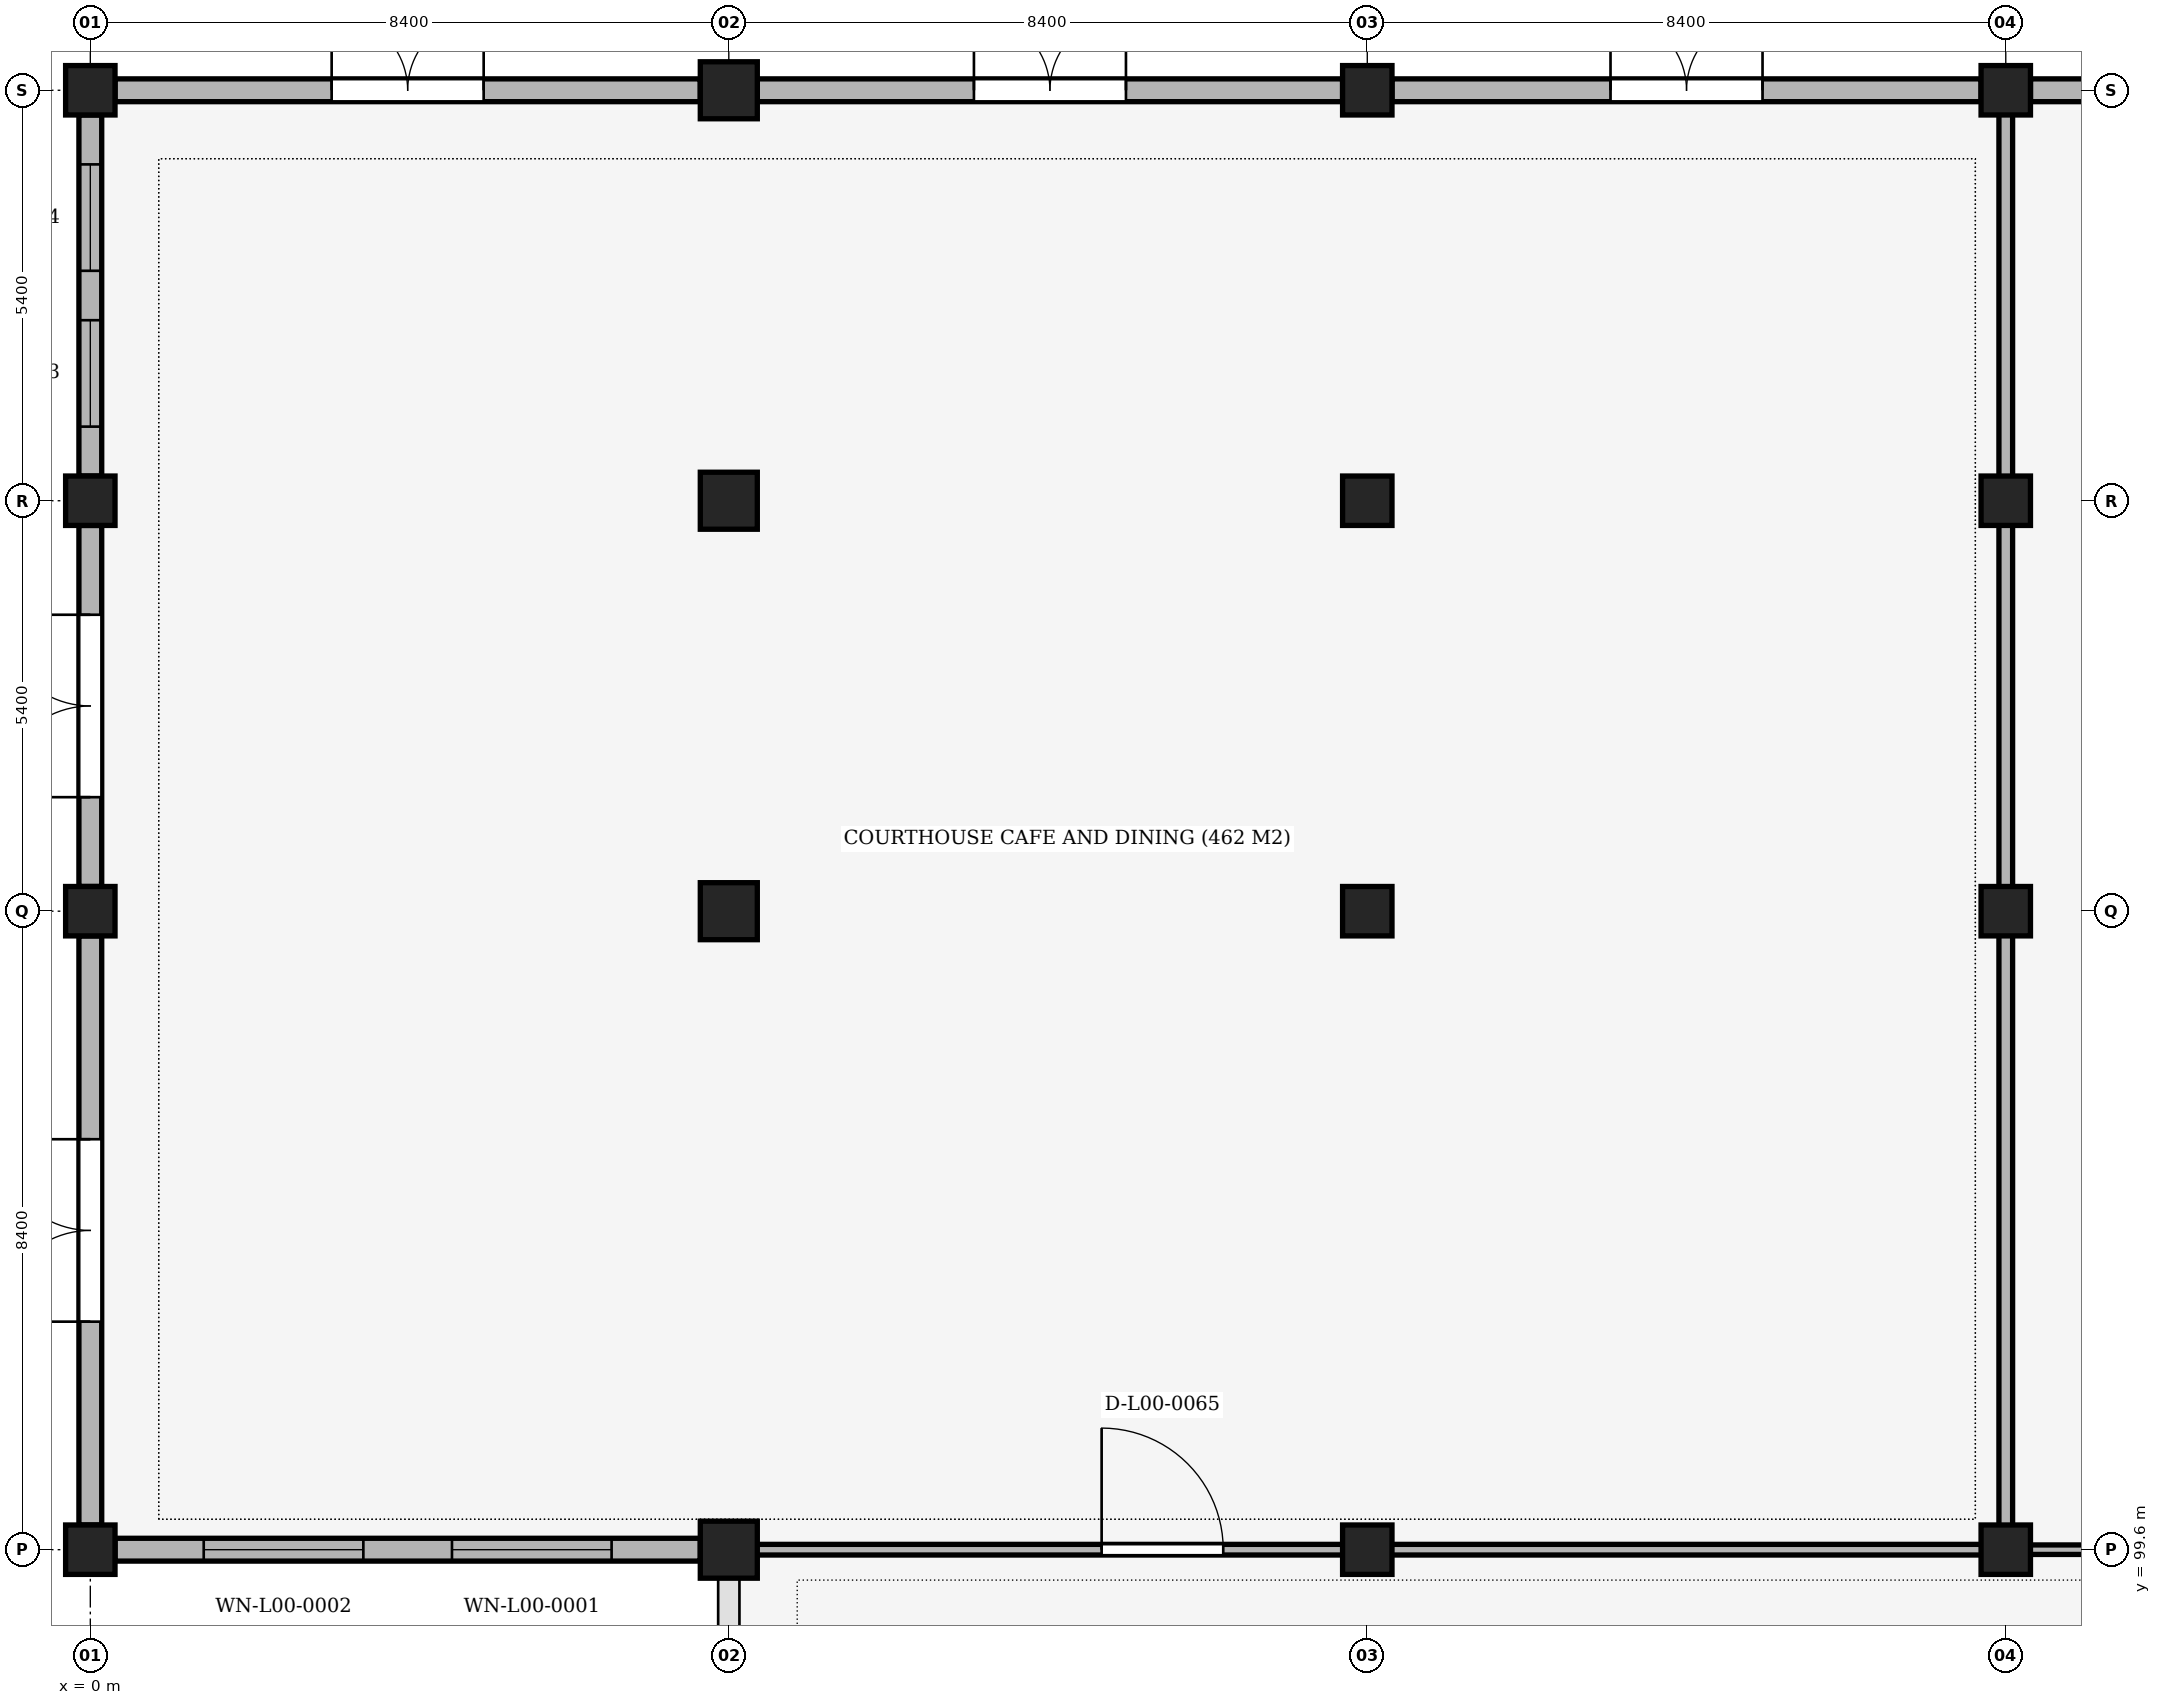
"""IFC4 building model, lengths in metres.
Left out: names, types, materials, properties, quantities, classifications, styles, units other than length and angle.
Written with IfcOpenShell. Run it as: python <this file> out.ifc"""

import sys

from ifc_helpers import new_model, si_unit, direction, frame, frame_2d, origin, origin_2d, place, context, subcontext, project, spatial, rectangle, circle, extrude, element, fill, save


model = new_model("IFC4")
c1 = context("Model", 3, precision=1e-05, world=origin(), true_north=direction((0.0, 1.0)))
c2 = subcontext(c1, "Body", "Model", "MODEL_VIEW")
j1 = project(units=[si_unit("LENGTHUNIT", "METRE"), si_unit("PLANEANGLEUNIT", "RADIAN")], contexts=[c1])
p1 = place(None, origin())
s1 = spatial("IfcSite", under=j1, at=p1, CompositionType="ELEMENT")
p2 = place(p1, origin())
s2 = spatial("IfcBuilding", under=s1, at=p2, CompositionType="ELEMENT")
p3 = place(p2, origin())
s3 = spatial("IfcBuildingStorey", under=s2, at=p3, CompositionType="ELEMENT", Elevation=0.0)
for number, where, z_axis, x_axis in (
    (1, (0.0, 99.6, 0.0), (0.0, 0.0, 1.0), (1.0, 0.0, 0.0)),
    (2, (0.0, 108.0, 0.0), (0.0, 0.0, 1.0), (1.0, 0.0, 0.0)),
    (3, (0.0, 113.4, 0.0), (0.0, 0.0, 1.0), (1.0, 0.0, 0.0)),
    (4, (0.0, 118.8, 0.0), (0.0, 0.0, 1.0), (1.0, 0.0, 0.0)),
):
    element("IfcColumn", number, at=place(p3, frame(where, z_axis=z_axis, x_axis=x_axis)), inside=s3, PredefinedType="COLUMN", context=c2, shape_type="SweptSolid", body=[
        extrude(rectangle(XDim=0.65, YDim=0.65, at=origin_2d()), origin(), (0.0, 0.0, 1.0), 5.1),
    ])
for number, where, z_axis, x_axis in (
    (5, (8.4, 99.6, 0.0), (0.0, 0.0, 1.0), (1.0, 0.0, 0.0)),
    (6, (8.4, 108.0, 0.0), (0.0, 0.0, 1.0), (1.0, 0.0, 0.0)),
    (7, (8.4, 113.4, 0.0), (0.0, 0.0, 1.0), (1.0, 0.0, 0.0)),
    (8, (8.4, 118.8, 0.0), (0.0, 0.0, 1.0), (1.0, 0.0, 0.0)),
):
    element("IfcColumn", number, at=place(p3, frame(where, z_axis=z_axis, x_axis=x_axis)), inside=s3, PredefinedType="COLUMN", context=c2, shape_type="SweptSolid", body=[
        extrude(circle(Radius=0.375, at=origin_2d()), origin(), (0.0, 0.0, 1.0), 5.1),
    ])
for number, where, z_axis, x_axis in (
    (9, (16.8, 99.6, 0.0), (0.0, 0.0, 1.0), (1.0, 0.0, 0.0)),
    (10, (16.8, 108.0, 0.0), (0.0, 0.0, 1.0), (1.0, 0.0, 0.0)),
    (11, (16.8, 113.4, 0.0), (0.0, 0.0, 1.0), (1.0, 0.0, 0.0)),
    (12, (16.8, 118.8, 0.0), (0.0, 0.0, 1.0), (1.0, 0.0, 0.0)),
    (13, (25.2, 99.6, 0.0), (0.0, 0.0, 1.0), (1.0, 0.0, 0.0)),
    (14, (25.2, 108.0, 0.0), (0.0, 0.0, 1.0), (1.0, 0.0, 0.0)),
    (15, (25.2, 113.4, 0.0), (0.0, 0.0, 1.0), (1.0, 0.0, 0.0)),
    (16, (25.2, 118.8, 0.0), (0.0, 0.0, 1.0), (1.0, 0.0, 0.0)),
):
    element("IfcColumn", number, at=place(p3, frame(where, z_axis=z_axis, x_axis=x_axis)), inside=s3, PredefinedType="COLUMN", context=c2, shape_type="SweptSolid", body=[
        extrude(rectangle(XDim=0.65, YDim=0.65, at=origin_2d()), origin(), (0.0, 0.0, 1.0), 5.1),
    ])
p4 = place(p3, frame((8.025, 99.6, 0.0), z_axis=(0.0, 0.0, 1.0), x_axis=(-1.0, 0.0, 0.0)))
e17 = element("IfcWall", 17, at=p4, inside=s3, PredefinedType="SOLIDWALL", context=c2, shape_type="SweptSolid", body=[
    extrude(rectangle(XDim=7.7, YDim=0.3, at=frame_2d((3.85, 0.0))), origin(), (0.0, 0.0, 1.0), 4.12),
])
p5 = place(p4, frame((1.167, 0.0, 0.9)))
e18 = element("IfcOpeningElement", 18, at=p5, cuts=e17, PredefinedType="OPENING", context=c2, shape_type="SweptSolid", body=[
    extrude(rectangle(XDim=2.1, YDim=2.1, at=frame_2d((1.05, 1.05))), frame((0.0, 0.165, 0.0), z_axis=(0.0, -1.0, 0.0), x_axis=(1.0, 0.0, 0.0)), (0.0, 0.0, 1.0), 0.33),
])
p6 = place(p4, frame((4.433, 0.0, 0.9)))
e19 = element("IfcOpeningElement", 19, at=p6, cuts=e17, PredefinedType="OPENING", context=c2, shape_type="SweptSolid", body=[
    extrude(rectangle(XDim=2.1, YDim=2.1, at=frame_2d((1.05, 1.05))), frame((0.0, 0.165, 0.0), z_axis=(0.0, -1.0, 0.0), x_axis=(1.0, 0.0, 0.0)), (0.0, 0.0, 1.0), 0.33),
])
p7 = place(p3, frame((0.0, 99.925, 0.0), z_axis=(0.0, 0.0, 1.0), x_axis=(0.0, 1.0, 0.0)))
e20 = element("IfcWall", 20, at=p7, inside=s3, PredefinedType="SOLIDWALL", context=c2, shape_type="SweptSolid", body=[
    extrude(rectangle(XDim=7.75, YDim=0.3, at=frame_2d((3.875, 0.0))), origin(), (0.0, 0.0, 1.0), 4.02),
])
p8 = place(p7, frame((2.675, 0.0, 0.0)))
e21 = element("IfcOpeningElement", 21, at=p8, cuts=e20, PredefinedType="OPENING", context=c2, shape_type="SweptSolid", body=[
    extrude(rectangle(XDim=2.4, YDim=2.6, at=frame_2d((1.2, 1.3))), frame((0.0, 0.165, 0.0), z_axis=(0.0, -1.0, 0.0), x_axis=(1.0, 0.0, 0.0)), (0.0, 0.0, 1.0), 0.33),
])
p9 = place(p3, frame((0.0, 108.325, 0.0), z_axis=(0.0, 0.0, 1.0), x_axis=(0.0, 1.0, 0.0)))
e22 = element("IfcWall", 22, at=p9, inside=s3, PredefinedType="SOLIDWALL", context=c2, shape_type="SweptSolid", body=[
    extrude(rectangle(XDim=4.75, YDim=0.3, at=frame_2d((2.375, 0.0))), origin(), (0.0, 0.0, 1.0), 4.17),
])
p10 = place(p9, frame((1.175, 0.0, 0.0)))
e23 = element("IfcOpeningElement", 23, at=p10, cuts=e22, PredefinedType="OPENING", context=c2, shape_type="SweptSolid", body=[
    extrude(rectangle(XDim=2.4, YDim=2.6, at=frame_2d((1.2, 1.3))), frame((0.0, 0.165, 0.0), z_axis=(0.0, -1.0, 0.0), x_axis=(1.0, 0.0, 0.0)), (0.0, 0.0, 1.0), 0.33),
])
p11 = place(p3, frame((0.0, 113.725, 0.0), z_axis=(0.0, 0.0, 1.0), x_axis=(0.0, 1.0, 0.0)))
e24 = element("IfcWall", 24, at=p11, inside=s3, PredefinedType="SOLIDWALL", context=c2, shape_type="SweptSolid", body=[
    extrude(rectangle(XDim=4.75, YDim=0.3, at=frame_2d((2.375, 0.0))), origin(), (0.0, 0.0, 1.0), 4.17),
])
p12 = place(p11, frame((0.65, 0.0, 0.85)))
e25 = element("IfcOpeningElement", 25, at=p12, cuts=e24, PredefinedType="OPENING", context=c2, shape_type="SweptSolid", body=[
    extrude(rectangle(XDim=1.4, YDim=2.4, at=frame_2d((0.7, 1.2))), frame((0.0, 0.165, 0.0), z_axis=(0.0, -1.0, 0.0), x_axis=(1.0, 0.0, 0.0)), (0.0, 0.0, 1.0), 0.33),
])
p13 = place(p11, frame((2.7, 0.0, 0.85)))
e26 = element("IfcOpeningElement", 26, at=p13, cuts=e24, PredefinedType="OPENING", context=c2, shape_type="SweptSolid", body=[
    extrude(rectangle(XDim=1.4, YDim=2.4, at=frame_2d((0.7, 1.2))), frame((0.0, 0.165, 0.0), z_axis=(0.0, -1.0, 0.0), x_axis=(1.0, 0.0, 0.0)), (0.0, 0.0, 1.0), 0.33),
])
p14 = place(p3, frame((0.325, 118.8, 0.0), z_axis=(0.0, 0.0, 1.0), x_axis=(1.0, 0.0, 0.0)))
e27 = element("IfcWall", 27, at=p14, inside=s3, PredefinedType="SOLIDWALL", context=c2, shape_type="SweptSolid", body=[
    extrude(rectangle(XDim=7.7, YDim=0.3, at=frame_2d((3.85, 0.0))), origin(), (0.0, 0.0, 1.0), 4.12),
])
p15 = place(p14, frame((2.85, 0.0, 0.0)))
e28 = element("IfcOpeningElement", 28, at=p15, cuts=e27, PredefinedType="OPENING", context=c2, shape_type="SweptSolid", body=[
    extrude(rectangle(XDim=2.0, YDim=2.4, at=frame_2d((1.0, 1.2))), frame((0.0, 0.165, 0.0), z_axis=(0.0, -1.0, 0.0), x_axis=(1.0, 0.0, 0.0)), (0.0, 0.0, 1.0), 0.33),
])
p16 = place(p3, frame((8.775, 118.8, 0.0), z_axis=(0.0, 0.0, 1.0), x_axis=(1.0, 0.0, 0.0)))
e29 = element("IfcWall", 29, at=p16, inside=s3, PredefinedType="SOLIDWALL", context=c2, shape_type="SweptSolid", body=[
    extrude(rectangle(XDim=7.7, YDim=0.3, at=frame_2d((3.85, 0.0))), origin(), (0.0, 0.0, 1.0), 4.12),
])
p17 = place(p16, frame((2.85, 0.0, 0.0)))
e30 = element("IfcOpeningElement", 30, at=p17, cuts=e29, PredefinedType="OPENING", context=c2, shape_type="SweptSolid", body=[
    extrude(rectangle(XDim=2.0, YDim=2.4, at=frame_2d((1.0, 1.2))), frame((0.0, 0.165, 0.0), z_axis=(0.0, -1.0, 0.0), x_axis=(1.0, 0.0, 0.0)), (0.0, 0.0, 1.0), 0.33),
])
p18 = place(p3, frame((17.125, 118.8, 0.0), z_axis=(0.0, 0.0, 1.0), x_axis=(1.0, 0.0, 0.0)))
e31 = element("IfcWall", 31, at=p18, inside=s3, PredefinedType="SOLIDWALL", context=c2, shape_type="SweptSolid", body=[
    extrude(rectangle(XDim=7.75, YDim=0.3, at=frame_2d((3.875, 0.0))), origin(), (0.0, 0.0, 1.0), 4.12),
])
p19 = place(p18, frame((2.875, 0.0, 0.0)))
e32 = element("IfcOpeningElement", 32, at=p19, cuts=e31, PredefinedType="OPENING", context=c2, shape_type="SweptSolid", body=[
    extrude(rectangle(XDim=2.0, YDim=2.4, at=frame_2d((1.0, 1.2))), frame((0.0, 0.165, 0.0), z_axis=(0.0, -1.0, 0.0), x_axis=(1.0, 0.0, 0.0)), (0.0, 0.0, 1.0), 0.33),
])
p20 = place(p3, frame((25.525, 118.8, 0.0), z_axis=(0.0, 0.0, 1.0), x_axis=(1.0, 0.0, 0.0)))
e33 = element("IfcWall", 33, at=p20, inside=s3, PredefinedType="SOLIDWALL", context=c2, shape_type="SweptSolid", body=[
    extrude(rectangle(XDim=7.75, YDim=0.3, at=frame_2d((3.875, 0.0))), origin(), (0.0, 0.0, 1.0), 4.12),
])
p21 = place(p20, frame((2.875, 0.0, 0.0)))
e34 = element("IfcOpeningElement", 34, at=p21, cuts=e33, PredefinedType="OPENING", context=c2, shape_type="SweptSolid", body=[
    extrude(rectangle(XDim=2.0, YDim=2.4, at=frame_2d((1.0, 1.2))), frame((0.0, 0.165, 0.0), z_axis=(0.0, -1.0, 0.0), x_axis=(1.0, 0.0, 0.0)), (0.0, 0.0, 1.0), 0.33),
])
p22 = place(p3, frame((8.41, 99.6, 0.0), z_axis=(0.0, 0.0, 1.0), x_axis=(1.0, 0.0, 0.0)))
e35 = element("IfcWall", 35, at=p22, inside=s3, PredefinedType="PARTITIONING", context=c2, shape_type="SweptSolid", body=[
    extrude(rectangle(XDim=16.79, YDim=0.14, at=frame_2d((8.395, 0.0))), origin(), (0.0, 0.0, 1.0), 4.02),
])
p23 = place(p22, frame((4.895, 0.0, 0.0)))
e36 = element("IfcOpeningElement", 36, at=p23, cuts=e35, PredefinedType="OPENING", context=c2, shape_type="SweptSolid", body=[
    extrude(rectangle(XDim=1.6, YDim=2.3, at=frame_2d((0.8, 1.15))), frame((0.0, 0.085, 0.0), z_axis=(0.0, -1.0, 0.0), x_axis=(1.0, 0.0, 0.0)), (0.0, 0.0, 1.0), 0.17),
])
p24 = place(p3, frame((25.2, 99.6, 0.0), z_axis=(0.0, 0.0, 1.0), x_axis=(1.0, 0.0, 0.0)))
e37 = element("IfcWall", 37, at=p24, inside=s3, PredefinedType="PARTITIONING", context=c2, shape_type="SweptSolid", body=[
    extrude(rectangle(XDim=16.761, YDim=0.125, at=frame_2d((8.38, 0.0))), origin(), (0.0, 0.0, 1.0), 4.02),
])
p25 = place(p3, frame((25.2, 99.672, 0.0), z_axis=(0.0, 0.0, 1.0), x_axis=(0.0, 1.0, 0.0)))
e38 = element("IfcWall", 38, at=p25, inside=s3, PredefinedType="PARTITIONING", context=c2, shape_type="SweptSolid", body=[
    extrude(rectangle(XDim=19.079, YDim=0.18, at=frame_2d((9.54, 0.0))), origin(), (0.0, 0.0, 1.0), 4.02),
])
p26 = place(p5, origin())
e39 = element("IfcWindow", 39, at=p26, inside=s3, PartitioningType="SINGLE_PANEL", PredefinedType="WINDOW", context=c2, shape_type="SweptSolid", body=[
    extrude(rectangle(XDim=2.1, YDim=2.1, at=frame_2d((1.05, 1.05))), frame((0.0, 0.03, 0.0), z_axis=(0.0, -1.0, 0.0), x_axis=(1.0, 0.0, 0.0)), (0.0, 0.0, 1.0), 0.06),
])
fill(e18, e39)
p27 = place(p6, origin())
e40 = element("IfcWindow", 40, at=p27, inside=s3, PartitioningType="SINGLE_PANEL", PredefinedType="WINDOW", context=c2, shape_type="SweptSolid", body=[
    extrude(rectangle(XDim=2.1, YDim=2.1, at=frame_2d((1.05, 1.05))), frame((0.0, 0.03, 0.0), z_axis=(0.0, -1.0, 0.0), x_axis=(1.0, 0.0, 0.0)), (0.0, 0.0, 1.0), 0.06),
])
fill(e19, e40)
p28 = place(p8, origin())
e41 = element("IfcDoor", 41, at=p28, inside=s3, OperationType="DOUBLE_DOOR_SINGLE_SWING", PredefinedType="DOOR", context=c2, shape_type="SweptSolid", body=[
    extrude(rectangle(XDim=2.4, YDim=2.6, at=frame_2d((1.2, 1.3))), frame((0.0, 0.025, 0.0), z_axis=(0.0, -1.0, 0.0), x_axis=(1.0, 0.0, 0.0)), (0.0, 0.0, 1.0), 0.05),
])
fill(e21, e41)
p29 = place(p10, origin())
e42 = element("IfcDoor", 42, at=p29, inside=s3, OperationType="DOUBLE_DOOR_SINGLE_SWING", PredefinedType="DOOR", context=c2, shape_type="SweptSolid", body=[
    extrude(rectangle(XDim=2.4, YDim=2.6, at=frame_2d((1.2, 1.3))), frame((0.0, 0.025, 0.0), z_axis=(0.0, -1.0, 0.0), x_axis=(1.0, 0.0, 0.0)), (0.0, 0.0, 1.0), 0.05),
])
fill(e23, e42)
p30 = place(p12, origin())
e43 = element("IfcWindow", 43, at=p30, inside=s3, PartitioningType="SINGLE_PANEL", PredefinedType="WINDOW", context=c2, shape_type="SweptSolid", body=[
    extrude(rectangle(XDim=1.4, YDim=2.4, at=frame_2d((0.7, 1.2))), frame((0.0, 0.03, 0.0), z_axis=(0.0, -1.0, 0.0), x_axis=(1.0, 0.0, 0.0)), (0.0, 0.0, 1.0), 0.06),
])
fill(e25, e43)
p31 = place(p13, origin())
e44 = element("IfcWindow", 44, at=p31, inside=s3, PartitioningType="SINGLE_PANEL", PredefinedType="WINDOW", context=c2, shape_type="SweptSolid", body=[
    extrude(rectangle(XDim=1.4, YDim=2.4, at=frame_2d((0.7, 1.2))), frame((0.0, 0.03, 0.0), z_axis=(0.0, -1.0, 0.0), x_axis=(1.0, 0.0, 0.0)), (0.0, 0.0, 1.0), 0.06),
])
fill(e26, e44)
p32 = place(p15, origin())
e45 = element("IfcDoor", 45, at=p32, inside=s3, OperationType="DOUBLE_DOOR_SINGLE_SWING", PredefinedType="DOOR", context=c2, shape_type="SweptSolid", body=[
    extrude(rectangle(XDim=2.0, YDim=2.4, at=frame_2d((1.0, 1.2))), frame((0.0, 0.025, 0.0), z_axis=(0.0, -1.0, 0.0), x_axis=(1.0, 0.0, 0.0)), (0.0, 0.0, 1.0), 0.05),
])
fill(e28, e45)
p33 = place(p17, origin())
e46 = element("IfcDoor", 46, at=p33, inside=s3, OperationType="DOUBLE_DOOR_SINGLE_SWING", PredefinedType="DOOR", context=c2, shape_type="SweptSolid", body=[
    extrude(rectangle(XDim=2.0, YDim=2.4, at=frame_2d((1.0, 1.2))), frame((0.0, 0.025, 0.0), z_axis=(0.0, -1.0, 0.0), x_axis=(1.0, 0.0, 0.0)), (0.0, 0.0, 1.0), 0.05),
])
fill(e30, e46)
p34 = place(p19, origin())
e47 = element("IfcDoor", 47, at=p34, inside=s3, OperationType="DOUBLE_DOOR_SINGLE_SWING", PredefinedType="DOOR", context=c2, shape_type="SweptSolid", body=[
    extrude(rectangle(XDim=2.0, YDim=2.4, at=frame_2d((1.0, 1.2))), frame((0.0, 0.025, 0.0), z_axis=(0.0, -1.0, 0.0), x_axis=(1.0, 0.0, 0.0)), (0.0, 0.0, 1.0), 0.05),
])
fill(e32, e47)
p35 = place(p23, origin())
e48 = element("IfcDoor", 48, at=p35, inside=s3, OperationType="SINGLE_SWING_LEFT", PredefinedType="DOOR", context=c2, shape_type="SweptSolid", body=[
    extrude(rectangle(XDim=1.6, YDim=2.3, at=frame_2d((0.8, 1.15))), frame((0.0, 0.025, 0.0), z_axis=(0.0, -1.0, 0.0), x_axis=(1.0, 0.0, 0.0)), (0.0, 0.0, 1.0), 0.05),
])
fill(e36, e48)
save(model, sys.argv[1])
